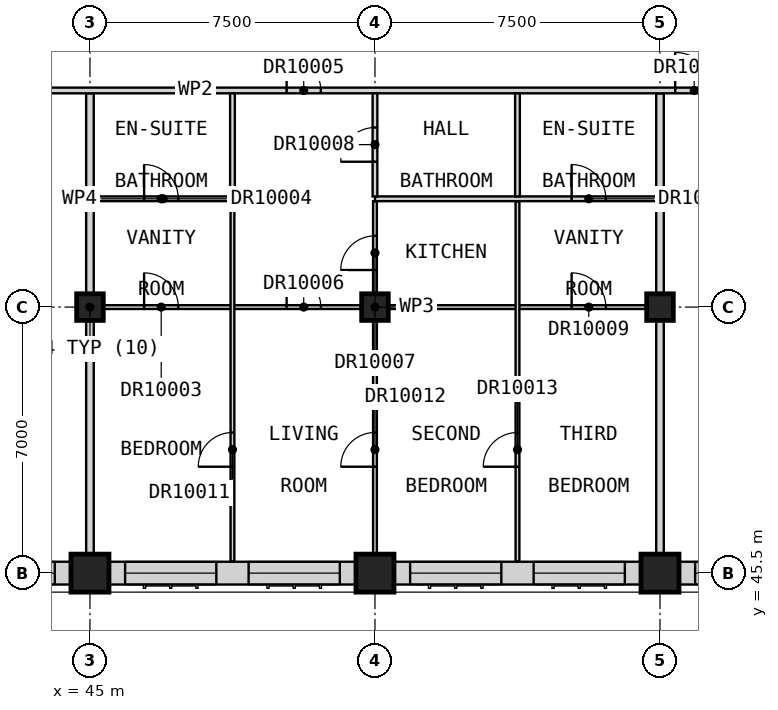
"""IFC4 building model, lengths in metres.
Left out: names, types, materials, properties, quantities, classifications, styles, units other than length and angle.
Written with IfcOpenShell. Run it as: python <this file> out.ifc"""

import sys

from ifc_helpers import new_model, si_unit, direction, frame, frame_2d, origin, origin_2d, place, context, subcontext, project, spatial, rectangle, extrude, element, fill, save


model = new_model("IFC4")
c1 = context("Model", 3, precision=1e-05, world=origin(), true_north=direction((0.0, 1.0)))
c2 = subcontext(c1, "Body", "Model", "MODEL_VIEW")
j1 = project(units=[si_unit("LENGTHUNIT", "METRE"), si_unit("PLANEANGLEUNIT", "RADIAN")], contexts=[c1])
p1 = place(None, origin())
s1 = spatial("IfcSite", under=j1, at=p1, CompositionType="ELEMENT")
p2 = place(p1, origin())
s2 = spatial("IfcBuilding", under=s1, at=p2, CompositionType="ELEMENT")
p3 = place(p2, frame((0.0, 0.0, 273.2)))
s3 = spatial("IfcBuildingStorey", under=s2, at=p3, CompositionType="ELEMENT", Elevation=273.2)
p4 = place(p3, frame((45.0, 45.5, 0.0), z_axis=(0.0, 0.0, 1.0), x_axis=(1.0, 0.0, 0.0)))
e1 = element("IfcColumn", 1, at=p4, inside=s3, PredefinedType="COLUMN", context=c2, shape_type="SweptSolid", body=[
    extrude(rectangle(XDim=1.0, YDim=1.0, at=origin_2d()), origin(), (0.0, 0.0, 1.0), 3.5),
])
p5 = place(p3, frame((45.0, 52.5, 0.0), z_axis=(0.0, 0.0, 1.0), x_axis=(1.0, 0.0, 0.0)))
e2 = element("IfcColumn", 2, at=p5, inside=s3, PredefinedType="COLUMN", context=c2, shape_type="SweptSolid", body=[
    extrude(rectangle(XDim=0.7, YDim=0.7, at=origin_2d()), origin(), (0.0, 0.0, 1.0), 3.5),
])
p6 = place(p3, frame((52.5, 45.5, 0.0), z_axis=(0.0, 0.0, 1.0), x_axis=(1.0, 0.0, 0.0)))
e3 = element("IfcColumn", 3, at=p6, inside=s3, PredefinedType="COLUMN", context=c2, shape_type="SweptSolid", body=[
    extrude(rectangle(XDim=1.0, YDim=1.0, at=origin_2d()), origin(), (0.0, 0.0, 1.0), 3.5),
])
p7 = place(p3, frame((52.5, 52.5, 0.0), z_axis=(0.0, 0.0, 1.0), x_axis=(1.0, 0.0, 0.0)))
e4 = element("IfcColumn", 4, at=p7, inside=s3, PredefinedType="COLUMN", context=c2, shape_type="SweptSolid", body=[
    extrude(rectangle(XDim=0.7, YDim=0.7, at=origin_2d()), origin(), (0.0, 0.0, 1.0), 3.5),
])
p8 = place(p3, frame((60.0, 45.5, 0.0), z_axis=(0.0, 0.0, 1.0), x_axis=(1.0, 0.0, 0.0)))
e5 = element("IfcColumn", 5, at=p8, inside=s3, PredefinedType="COLUMN", context=c2, shape_type="SweptSolid", body=[
    extrude(rectangle(XDim=1.0, YDim=1.0, at=origin_2d()), origin(), (0.0, 0.0, 1.0), 3.5),
])
p9 = place(p3, frame((60.0, 52.5, 0.0), z_axis=(0.0, 0.0, 1.0), x_axis=(1.0, 0.0, 0.0)))
e6 = element("IfcColumn", 6, at=p9, inside=s3, PredefinedType="COLUMN", context=c2, shape_type="SweptSolid", body=[
    extrude(rectangle(XDim=0.7, YDim=0.7, at=origin_2d()), origin(), (0.0, 0.0, 1.0), 3.5),
])
p10 = place(p3, frame((38.0, 45.5, 0.0), z_axis=(0.0, 0.0, 1.0), x_axis=(1.0, 0.0, 0.0)))
e7 = element("IfcWall", 7, at=p10, inside=s3, PredefinedType="SOLIDWALL", context=c2, shape_type="SweptSolid", body=[
    extrude(rectangle(XDim=6.5, YDim=0.6, at=frame_2d((3.25, 0.0))), origin(), (0.0, 0.0, 1.0), 2.75),
])
p11 = place(p10, frame((0.425, 0.0, 0.8)))
e8 = element("IfcOpeningElement", 8, at=p11, cuts=e7, PredefinedType="OPENING", context=c2, shape_type="SweptSolid", body=[
    extrude(rectangle(XDim=2.4, YDim=1.8, at=frame_2d((1.2, 0.9))), frame((0.0, 0.31, 0.0), z_axis=(0.0, -1.0, 0.0), x_axis=(1.0, 0.0, 0.0)), (0.0, 0.0, 1.0), 0.62),
])
p12 = place(p10, frame((3.675, 0.0, 0.8)))
e9 = element("IfcOpeningElement", 9, at=p12, cuts=e7, PredefinedType="OPENING", context=c2, shape_type="SweptSolid", body=[
    extrude(rectangle(XDim=2.4, YDim=1.8, at=frame_2d((1.2, 0.9))), frame((0.0, 0.31, 0.0), z_axis=(0.0, -1.0, 0.0), x_axis=(1.0, 0.0, 0.0)), (0.0, 0.0, 1.0), 0.62),
])
p13 = place(p3, frame((45.5, 45.5, 0.0), z_axis=(0.0, 0.0, 1.0), x_axis=(1.0, 0.0, 0.0)))
e10 = element("IfcWall", 10, at=p13, inside=s3, PredefinedType="SOLIDWALL", context=c2, shape_type="SweptSolid", body=[
    extrude(rectangle(XDim=6.5, YDim=0.6, at=frame_2d((3.25, 0.0))), origin(), (0.0, 0.0, 1.0), 2.75),
])
p14 = place(p13, frame((0.425, 0.0, 0.8)))
e11 = element("IfcOpeningElement", 11, at=p14, cuts=e10, PredefinedType="OPENING", context=c2, shape_type="SweptSolid", body=[
    extrude(rectangle(XDim=2.4, YDim=1.8, at=frame_2d((1.2, 0.9))), frame((0.0, 0.31, 0.0), z_axis=(0.0, -1.0, 0.0), x_axis=(1.0, 0.0, 0.0)), (0.0, 0.0, 1.0), 0.62),
])
p15 = place(p13, frame((3.675, 0.0, 0.8)))
e12 = element("IfcOpeningElement", 12, at=p15, cuts=e10, PredefinedType="OPENING", context=c2, shape_type="SweptSolid", body=[
    extrude(rectangle(XDim=2.4, YDim=1.8, at=frame_2d((1.2, 0.9))), frame((0.0, 0.31, 0.0), z_axis=(0.0, -1.0, 0.0), x_axis=(1.0, 0.0, 0.0)), (0.0, 0.0, 1.0), 0.62),
])
p16 = place(p3, frame((53.0, 45.5, 0.0), z_axis=(0.0, 0.0, 1.0), x_axis=(1.0, 0.0, 0.0)))
e13 = element("IfcWall", 13, at=p16, inside=s3, PredefinedType="SOLIDWALL", context=c2, shape_type="SweptSolid", body=[
    extrude(rectangle(XDim=6.5, YDim=0.6, at=frame_2d((3.25, 0.0))), origin(), (0.0, 0.0, 1.0), 2.75),
])
p17 = place(p16, frame((0.425, 0.0, 0.8)))
e14 = element("IfcOpeningElement", 14, at=p17, cuts=e13, PredefinedType="OPENING", context=c2, shape_type="SweptSolid", body=[
    extrude(rectangle(XDim=2.4, YDim=1.8, at=frame_2d((1.2, 0.9))), frame((0.0, 0.31, 0.0), z_axis=(0.0, -1.0, 0.0), x_axis=(1.0, 0.0, 0.0)), (0.0, 0.0, 1.0), 0.62),
])
p18 = place(p16, frame((3.675, 0.0, 0.8)))
e15 = element("IfcOpeningElement", 15, at=p18, cuts=e13, PredefinedType="OPENING", context=c2, shape_type="SweptSolid", body=[
    extrude(rectangle(XDim=2.4, YDim=1.8, at=frame_2d((1.2, 0.9))), frame((0.0, 0.31, 0.0), z_axis=(0.0, -1.0, 0.0), x_axis=(1.0, 0.0, 0.0)), (0.0, 0.0, 1.0), 0.62),
])
p19 = place(p3, frame((60.5, 45.5, 0.0), z_axis=(0.0, 0.0, 1.0), x_axis=(1.0, 0.0, 0.0)))
e16 = element("IfcWall", 16, at=p19, inside=s3, PredefinedType="SOLIDWALL", context=c2, shape_type="SweptSolid", body=[
    extrude(rectangle(XDim=6.5, YDim=0.6, at=frame_2d((3.25, 0.0))), origin(), (0.0, 0.0, 1.0), 2.75),
])
p20 = place(p19, frame((0.425, 0.0, 0.8)))
e17 = element("IfcOpeningElement", 17, at=p20, cuts=e16, PredefinedType="OPENING", context=c2, shape_type="SweptSolid", body=[
    extrude(rectangle(XDim=2.4, YDim=1.8, at=frame_2d((1.2, 0.9))), frame((0.0, 0.31, 0.0), z_axis=(0.0, -1.0, 0.0), x_axis=(1.0, 0.0, 0.0)), (0.0, 0.0, 1.0), 0.62),
])
p21 = place(p19, frame((3.675, 0.0, 0.8)))
e18 = element("IfcOpeningElement", 18, at=p21, cuts=e16, PredefinedType="OPENING", context=c2, shape_type="SweptSolid", body=[
    extrude(rectangle(XDim=2.4, YDim=1.8, at=frame_2d((1.2, 0.9))), frame((0.0, 0.31, 0.0), z_axis=(0.0, -1.0, 0.0), x_axis=(1.0, 0.0, 0.0)), (0.0, 0.0, 1.0), 0.62),
])
for number, where, z_axis, x_axis in (
    (19, (45.0, 45.0, 0.0), (0.0, 0.0, 1.0), (0.0, 1.0, 0.0)),
    (20, (60.0, 45.0, 0.0), (0.0, 0.0, 1.0), (0.0, 1.0, 0.0)),
):
    element("IfcWall", number, at=place(p3, frame(where, z_axis=z_axis, x_axis=x_axis)), inside=s3, PredefinedType="PARTITIONING", context=c2, shape_type="SweptSolid", body=[
        extrude(rectangle(XDim=13.125, YDim=0.2, at=frame_2d((6.562, 0.0))), origin(), (0.0, 0.0, 1.0), 3.25),
    ])
p22 = place(p3, frame((33.75, 58.2, 0.0), z_axis=(0.0, 0.0, 1.0), x_axis=(1.0, 0.0, 0.0)))
e21 = element("IfcWall", 21, at=p22, inside=s3, PredefinedType="PARTITIONING", context=c2, shape_type="SweptSolid", body=[
    extrude(rectangle(XDim=28.05, YDim=0.15, at=frame_2d((14.025, 0.0))), origin(), (0.0, 0.0, 1.0), 3.25),
])
p23 = place(p22, frame((5.125, 0.0, 0.0)))
e22 = element("IfcOpeningElement", 22, at=p23, cuts=e21, PredefinedType="OPENING", context=c2, shape_type="SweptSolid", body=[
    extrude(rectangle(XDim=1.0, YDim=2.1, at=frame_2d((0.5, 1.05))), frame((0.0, 0.085, 0.0), z_axis=(0.0, -1.0, 0.0), x_axis=(1.0, 0.0, 0.0)), (0.0, 0.0, 1.0), 0.17),
])
p24 = place(p22, frame((16.425, 0.0, 0.0)))
e23 = element("IfcOpeningElement", 23, at=p24, cuts=e21, PredefinedType="OPENING", context=c2, shape_type="SweptSolid", body=[
    extrude(rectangle(XDim=0.9, YDim=2.1, at=frame_2d((0.45, 1.05))), frame((0.0, 0.085, 0.0), z_axis=(0.0, -1.0, 0.0), x_axis=(1.0, 0.0, 0.0)), (0.0, 0.0, 1.0), 0.17),
])
p25 = place(p22, frame((26.65, 0.0, 0.0)))
e24 = element("IfcOpeningElement", 24, at=p25, cuts=e21, PredefinedType="OPENING", context=c2, shape_type="SweptSolid", body=[
    extrude(rectangle(XDim=1.0, YDim=2.1, at=frame_2d((0.5, 1.05))), frame((0.0, 0.085, 0.0), z_axis=(0.0, -1.0, 0.0), x_axis=(1.0, 0.0, 0.0)), (0.0, 0.0, 1.0), 0.17),
])
p26 = place(p3, frame((45.1, 52.5, 0.0), z_axis=(0.0, 0.0, 1.0), x_axis=(1.0, 0.0, 0.0)))
e25 = element("IfcWall", 25, at=p26, inside=s3, PredefinedType="PARTITIONING", context=c2, shape_type="SweptSolid", body=[
    extrude(rectangle(XDim=14.8, YDim=0.1, at=frame_2d((7.4, 0.0))), origin(), (0.0, 0.0, 1.0), 3.25),
])
p27 = place(p26, frame((1.325, 0.0, 0.0)))
e26 = element("IfcOpeningElement", 26, at=p27, cuts=e25, PredefinedType="OPENING", context=c2, shape_type="SweptSolid", body=[
    extrude(rectangle(XDim=0.9, YDim=2.1, at=frame_2d((0.45, 1.05))), frame((0.0, 0.06, 0.0), z_axis=(0.0, -1.0, 0.0), x_axis=(1.0, 0.0, 0.0)), (0.0, 0.0, 1.0), 0.12),
])
p28 = place(p26, frame((5.075, 0.0, 0.0)))
e27 = element("IfcOpeningElement", 27, at=p28, cuts=e25, PredefinedType="OPENING", context=c2, shape_type="SweptSolid", body=[
    extrude(rectangle(XDim=0.9, YDim=2.1, at=frame_2d((0.45, 1.05))), frame((0.0, 0.06, 0.0), z_axis=(0.0, -1.0, 0.0), x_axis=(1.0, 0.0, 0.0)), (0.0, 0.0, 1.0), 0.12),
])
p29 = place(p26, frame((12.575, 0.0, 0.0)))
e28 = element("IfcOpeningElement", 28, at=p29, cuts=e25, PredefinedType="OPENING", context=c2, shape_type="SweptSolid", body=[
    extrude(rectangle(XDim=0.9, YDim=2.1, at=frame_2d((0.45, 1.05))), frame((0.0, 0.06, 0.0), z_axis=(0.0, -1.0, 0.0), x_axis=(1.0, 0.0, 0.0)), (0.0, 0.0, 1.0), 0.12),
])
p30 = place(p3, frame((48.75, 45.81, 0.0), z_axis=(0.0, 0.0, 1.0), x_axis=(0.0, 1.0, 0.0)))
e29 = element("IfcWall", 29, at=p30, inside=s3, PredefinedType="PARTITIONING", context=c2, shape_type="SweptSolid", body=[
    extrude(rectangle(XDim=9.478, YDim=0.1, at=frame_2d((4.739, 0.0))), origin(), (0.0, 0.0, 1.0), 3.25),
])
p31 = place(p30, frame((2.49, 0.0, 0.0)))
e30 = element("IfcOpeningElement", 30, at=p31, cuts=e29, PredefinedType="OPENING", context=c2, shape_type="SweptSolid", body=[
    extrude(rectangle(XDim=0.9, YDim=2.1, at=frame_2d((0.45, 1.05))), frame((0.0, 0.06, 0.0), z_axis=(0.0, -1.0, 0.0), x_axis=(1.0, 0.0, 0.0)), (0.0, 0.0, 1.0), 0.12),
])
p32 = place(p3, frame((52.5, 45.0, 0.0), z_axis=(0.0, 0.0, 1.0), x_axis=(0.0, 1.0, 0.0)))
e31 = element("IfcWall", 31, at=p32, inside=s3, PredefinedType="PARTITIONING", context=c2, shape_type="SweptSolid", body=[
    extrude(rectangle(XDim=10.288, YDim=0.1, at=frame_2d((5.144, 0.0))), origin(), (0.0, 0.0, 1.0), 3.25),
])
p33 = place(p32, frame((8.475, 0.0, 0.0)))
e32 = element("IfcOpeningElement", 32, at=p33, cuts=e31, PredefinedType="OPENING", context=c2, shape_type="SweptSolid", body=[
    extrude(rectangle(XDim=0.9, YDim=2.1, at=frame_2d((0.45, 1.05))), frame((0.0, 0.06, 0.0), z_axis=(0.0, -1.0, 0.0), x_axis=(1.0, 0.0, 0.0)), (0.0, 0.0, 1.0), 0.12),
])
p34 = place(p32, frame((3.3, 0.0, 0.0)))
e33 = element("IfcOpeningElement", 33, at=p34, cuts=e31, PredefinedType="OPENING", context=c2, shape_type="SweptSolid", body=[
    extrude(rectangle(XDim=0.9, YDim=2.1, at=frame_2d((0.45, 1.05))), frame((0.0, 0.06, 0.0), z_axis=(0.0, -1.0, 0.0), x_axis=(1.0, 0.0, 0.0)), (0.0, 0.0, 1.0), 0.12),
])
p35 = place(p3, frame((56.25, 45.81, 0.0), z_axis=(0.0, 0.0, 1.0), x_axis=(0.0, 1.0, 0.0)))
e34 = element("IfcWall", 34, at=p35, inside=s3, PredefinedType="PARTITIONING", context=c2, shape_type="SweptSolid", body=[
    extrude(rectangle(XDim=9.478, YDim=0.1, at=frame_2d((4.739, 0.0))), origin(), (0.0, 0.0, 1.0), 3.25),
])
p36 = place(p35, frame((2.49, 0.0, 0.0)))
e35 = element("IfcOpeningElement", 35, at=p36, cuts=e34, PredefinedType="OPENING", context=c2, shape_type="SweptSolid", body=[
    extrude(rectangle(XDim=0.9, YDim=2.1, at=frame_2d((0.45, 1.05))), frame((0.0, 0.06, 0.0), z_axis=(0.0, -1.0, 0.0), x_axis=(1.0, 0.0, 0.0)), (0.0, 0.0, 1.0), 0.12),
])
p37 = place(p3, frame((45.1, 55.35, 0.0), z_axis=(0.0, 0.0, 1.0), x_axis=(1.0, 0.0, 0.0)))
e36 = element("IfcWall", 36, at=p37, inside=s3, PredefinedType="PARTITIONING", context=c2, shape_type="SweptSolid", body=[
    extrude(rectangle(XDim=3.65, YDim=0.125, at=frame_2d((1.825, 0.0))), origin(), (0.0, 0.0, 1.0), 3.25),
])
p38 = place(p37, frame((1.325, 0.0, 0.0)))
e37 = element("IfcOpeningElement", 37, at=p38, cuts=e36, PredefinedType="OPENING", context=c2, shape_type="SweptSolid", body=[
    extrude(rectangle(XDim=0.9, YDim=2.1, at=frame_2d((0.45, 1.05))), frame((0.0, 0.073, 0.0), z_axis=(0.0, -1.0, 0.0), x_axis=(1.0, 0.0, 0.0)), (0.0, 0.0, 1.0), 0.145),
])
p39 = place(p3, frame((52.5, 55.35, 0.0), z_axis=(0.0, 0.0, 1.0), x_axis=(1.0, 0.0, 0.0)))
e38 = element("IfcWall", 38, at=p39, inside=s3, PredefinedType="PARTITIONING", context=c2, shape_type="SweptSolid", body=[
    extrude(rectangle(XDim=7.4, YDim=0.125, at=frame_2d((3.7, 0.0))), origin(), (0.0, 0.0, 1.0), 3.25),
])
p40 = place(p39, frame((5.175, 0.0, 0.0)))
e39 = element("IfcOpeningElement", 39, at=p40, cuts=e38, PredefinedType="OPENING", context=c2, shape_type="SweptSolid", body=[
    extrude(rectangle(XDim=0.9, YDim=2.1, at=frame_2d((0.45, 1.05))), frame((0.0, 0.073, 0.0), z_axis=(0.0, -1.0, 0.0), x_axis=(1.0, 0.0, 0.0)), (0.0, 0.0, 1.0), 0.145),
])
p41 = place(p3, frame((48.75, 55.413, 0.0), z_axis=(0.0, 0.0, 1.0), x_axis=(0.0, 1.0, 0.0)))
e40 = element("IfcWall", 40, at=p41, inside=s3, PredefinedType="PARTITIONING", context=c2, shape_type="SweptSolid", body=[
    extrude(rectangle(XDim=2.712, YDim=0.125, at=frame_2d((1.356, 0.0))), origin(), (0.0, 0.0, 1.0), 3.25),
])
p42 = place(p3, frame((52.5, 55.413, 0.0), z_axis=(0.0, 0.0, 1.0), x_axis=(0.0, 1.0, 0.0)))
e41 = element("IfcWall", 41, at=p42, inside=s3, PredefinedType="PARTITIONING", context=c2, shape_type="SweptSolid", body=[
    extrude(rectangle(XDim=2.712, YDim=0.125, at=frame_2d((1.356, 0.0))), origin(), (0.0, 0.0, 1.0), 3.25),
])
p43 = place(p42, frame((0.913, 0.0, 0.0)))
e42 = element("IfcOpeningElement", 42, at=p43, cuts=e41, PredefinedType="OPENING", context=c2, shape_type="SweptSolid", body=[
    extrude(rectangle(XDim=0.9, YDim=2.1, at=frame_2d((0.45, 1.05))), frame((0.0, 0.073, 0.0), z_axis=(0.0, -1.0, 0.0), x_axis=(1.0, 0.0, 0.0)), (0.0, 0.0, 1.0), 0.145),
])
p44 = place(p3, frame((56.25, 55.413, 0.0), z_axis=(0.0, 0.0, 1.0), x_axis=(0.0, 1.0, 0.0)))
e43 = element("IfcWall", 43, at=p44, inside=s3, PredefinedType="PARTITIONING", context=c2, shape_type="SweptSolid", body=[
    extrude(rectangle(XDim=2.712, YDim=0.125, at=frame_2d((1.356, 0.0))), origin(), (0.0, 0.0, 1.0), 3.25),
])
p45 = place(p12, origin())
e44 = element("IfcWindow", 44, at=p45, inside=s3, PartitioningType="SINGLE_PANEL", PredefinedType="WINDOW", context=c2, shape_type="SweptSolid", body=[
    extrude(rectangle(XDim=2.4, YDim=1.8, at=frame_2d((1.2, 0.9))), frame((0.0, -0.07, 0.0), z_axis=(0.0, -1.0, 0.0), x_axis=(1.0, 0.0, 0.0)), (0.0, 0.0, 1.0), 0.06),
])
fill(e9, e44)
p46 = place(p14, origin())
e45 = element("IfcWindow", 45, at=p46, inside=s3, PartitioningType="SINGLE_PANEL", PredefinedType="WINDOW", context=c2, shape_type="SweptSolid", body=[
    extrude(rectangle(XDim=2.4, YDim=1.8, at=frame_2d((1.2, 0.9))), frame((0.0, -0.07, 0.0), z_axis=(0.0, -1.0, 0.0), x_axis=(1.0, 0.0, 0.0)), (0.0, 0.0, 1.0), 0.06),
])
fill(e11, e45)
p47 = place(p15, origin())
e46 = element("IfcWindow", 46, at=p47, inside=s3, PartitioningType="SINGLE_PANEL", PredefinedType="WINDOW", context=c2, shape_type="SweptSolid", body=[
    extrude(rectangle(XDim=2.4, YDim=1.8, at=frame_2d((1.2, 0.9))), frame((0.0, -0.07, 0.0), z_axis=(0.0, -1.0, 0.0), x_axis=(1.0, 0.0, 0.0)), (0.0, 0.0, 1.0), 0.06),
])
fill(e12, e46)
p48 = place(p17, origin())
e47 = element("IfcWindow", 47, at=p48, inside=s3, PartitioningType="SINGLE_PANEL", PredefinedType="WINDOW", context=c2, shape_type="SweptSolid", body=[
    extrude(rectangle(XDim=2.4, YDim=1.8, at=frame_2d((1.2, 0.9))), frame((0.0, -0.07, 0.0), z_axis=(0.0, -1.0, 0.0), x_axis=(1.0, 0.0, 0.0)), (0.0, 0.0, 1.0), 0.06),
])
fill(e14, e47)
p49 = place(p18, origin())
e48 = element("IfcWindow", 48, at=p49, inside=s3, PartitioningType="SINGLE_PANEL", PredefinedType="WINDOW", context=c2, shape_type="SweptSolid", body=[
    extrude(rectangle(XDim=2.4, YDim=1.8, at=frame_2d((1.2, 0.9))), frame((0.0, -0.07, 0.0), z_axis=(0.0, -1.0, 0.0), x_axis=(1.0, 0.0, 0.0)), (0.0, 0.0, 1.0), 0.06),
])
fill(e15, e48)
p50 = place(p20, origin())
e49 = element("IfcWindow", 49, at=p50, inside=s3, PartitioningType="SINGLE_PANEL", PredefinedType="WINDOW", context=c2, shape_type="SweptSolid", body=[
    extrude(rectangle(XDim=2.4, YDim=1.8, at=frame_2d((1.2, 0.9))), frame((0.0, -0.07, 0.0), z_axis=(0.0, -1.0, 0.0), x_axis=(1.0, 0.0, 0.0)), (0.0, 0.0, 1.0), 0.06),
])
fill(e17, e49)
p51 = place(p27, origin())
e50 = element("IfcDoor", 50, at=p51, inside=s3, OperationType="SINGLE_SWING_LEFT", PredefinedType="DOOR", context=c2, shape_type="SweptSolid", body=[
    extrude(rectangle(XDim=0.9, YDim=2.1, at=frame_2d((0.45, 1.05))), frame((0.0, 0.025, 0.0), z_axis=(0.0, -1.0, 0.0), x_axis=(1.0, 0.0, 0.0)), (0.0, 0.0, 1.0), 0.05),
])
fill(e26, e50)
p52 = place(p38, origin())
e51 = element("IfcDoor", 51, at=p52, inside=s3, OperationType="SINGLE_SWING_LEFT", PredefinedType="DOOR", context=c2, shape_type="SweptSolid", body=[
    extrude(rectangle(XDim=0.9, YDim=2.1, at=frame_2d((0.45, 1.05))), frame((0.0, 0.025, 0.0), z_axis=(0.0, -1.0, 0.0), x_axis=(1.0, 0.0, 0.0)), (0.0, 0.0, 1.0), 0.05),
])
fill(e37, e51)
p53 = place(p24, origin())
e52 = element("IfcDoor", 52, at=p53, inside=s3, OperationType="SINGLE_SWING_RIGHT", PredefinedType="DOOR", context=c2, shape_type="SweptSolid", body=[
    extrude(rectangle(XDim=0.9, YDim=2.1, at=frame_2d((0.45, 1.05))), frame((0.0, 0.025, 0.0), z_axis=(0.0, -1.0, 0.0), x_axis=(1.0, 0.0, 0.0)), (0.0, 0.0, 1.0), 0.05),
])
fill(e23, e52)
p54 = place(p28, origin())
e53 = element("IfcDoor", 53, at=p54, inside=s3, OperationType="SINGLE_SWING_LEFT", PredefinedType="DOOR", context=c2, shape_type="SweptSolid", body=[
    extrude(rectangle(XDim=0.9, YDim=2.1, at=frame_2d((0.45, 1.05))), frame((0.0, 0.025, 0.0), z_axis=(0.0, -1.0, 0.0), x_axis=(1.0, 0.0, 0.0)), (0.0, 0.0, 1.0), 0.05),
])
fill(e27, e53)
p55 = place(p33, origin())
e54 = element("IfcDoor", 54, at=p55, inside=s3, OperationType="SINGLE_SWING_RIGHT", PredefinedType="DOOR", context=c2, shape_type="SweptSolid", body=[
    extrude(rectangle(XDim=0.9, YDim=2.1, at=frame_2d((0.45, 1.05))), frame((0.0, 0.025, 0.0), z_axis=(0.0, -1.0, 0.0), x_axis=(1.0, 0.0, 0.0)), (0.0, 0.0, 1.0), 0.05),
])
fill(e32, e54)
p56 = place(p43, origin())
e55 = element("IfcDoor", 55, at=p56, inside=s3, OperationType="SINGLE_SWING_RIGHT", PredefinedType="DOOR", context=c2, shape_type="SweptSolid", body=[
    extrude(rectangle(XDim=0.9, YDim=2.1, at=frame_2d((0.45, 1.05))), frame((0.0, 0.025, 0.0), z_axis=(0.0, -1.0, 0.0), x_axis=(1.0, 0.0, 0.0)), (0.0, 0.0, 1.0), 0.05),
])
fill(e42, e55)
p57 = place(p29, origin())
e56 = element("IfcDoor", 56, at=p57, inside=s3, OperationType="SINGLE_SWING_LEFT", PredefinedType="DOOR", context=c2, shape_type="SweptSolid", body=[
    extrude(rectangle(XDim=0.9, YDim=2.1, at=frame_2d((0.45, 1.05))), frame((0.0, 0.025, 0.0), z_axis=(0.0, -1.0, 0.0), x_axis=(1.0, 0.0, 0.0)), (0.0, 0.0, 1.0), 0.05),
])
fill(e28, e56)
p58 = place(p40, origin())
e57 = element("IfcDoor", 57, at=p58, inside=s3, OperationType="SINGLE_SWING_LEFT", PredefinedType="DOOR", context=c2, shape_type="SweptSolid", body=[
    extrude(rectangle(XDim=0.9, YDim=2.1, at=frame_2d((0.45, 1.05))), frame((0.0, 0.025, 0.0), z_axis=(0.0, -1.0, 0.0), x_axis=(1.0, 0.0, 0.0)), (0.0, 0.0, 1.0), 0.05),
])
fill(e39, e57)
p59 = place(p31, origin())
e58 = element("IfcDoor", 58, at=p59, inside=s3, OperationType="SINGLE_SWING_LEFT", PredefinedType="DOOR", context=c2, shape_type="SweptSolid", body=[
    extrude(rectangle(XDim=0.9, YDim=2.1, at=frame_2d((0.45, 1.05))), frame((0.0, 0.025, 0.0), z_axis=(0.0, -1.0, 0.0), x_axis=(1.0, 0.0, 0.0)), (0.0, 0.0, 1.0), 0.05),
])
fill(e30, e58)
p60 = place(p34, origin())
e59 = element("IfcDoor", 59, at=p60, inside=s3, OperationType="SINGLE_SWING_LEFT", PredefinedType="DOOR", context=c2, shape_type="SweptSolid", body=[
    extrude(rectangle(XDim=0.9, YDim=2.1, at=frame_2d((0.45, 1.05))), frame((0.0, 0.025, 0.0), z_axis=(0.0, -1.0, 0.0), x_axis=(1.0, 0.0, 0.0)), (0.0, 0.0, 1.0), 0.05),
])
fill(e33, e59)
p61 = place(p36, origin())
e60 = element("IfcDoor", 60, at=p61, inside=s3, OperationType="SINGLE_SWING_LEFT", PredefinedType="DOOR", context=c2, shape_type="SweptSolid", body=[
    extrude(rectangle(XDim=0.9, YDim=2.1, at=frame_2d((0.45, 1.05))), frame((0.0, 0.025, 0.0), z_axis=(0.0, -1.0, 0.0), x_axis=(1.0, 0.0, 0.0)), (0.0, 0.0, 1.0), 0.05),
])
fill(e35, e60)
p62 = place(p25, origin())
e61 = element("IfcDoor", 61, at=p62, inside=s3, OperationType="SINGLE_SWING_RIGHT", PredefinedType="DOOR", context=c2, shape_type="SweptSolid", body=[
    extrude(rectangle(XDim=1.0, YDim=2.1, at=frame_2d((0.5, 1.05))), frame((0.0, 0.025, 0.0), z_axis=(0.0, -1.0, 0.0), x_axis=(1.0, 0.0, 0.0)), (0.0, 0.0, 1.0), 0.05),
])
fill(e24, e61)
save(model, sys.argv[1])
